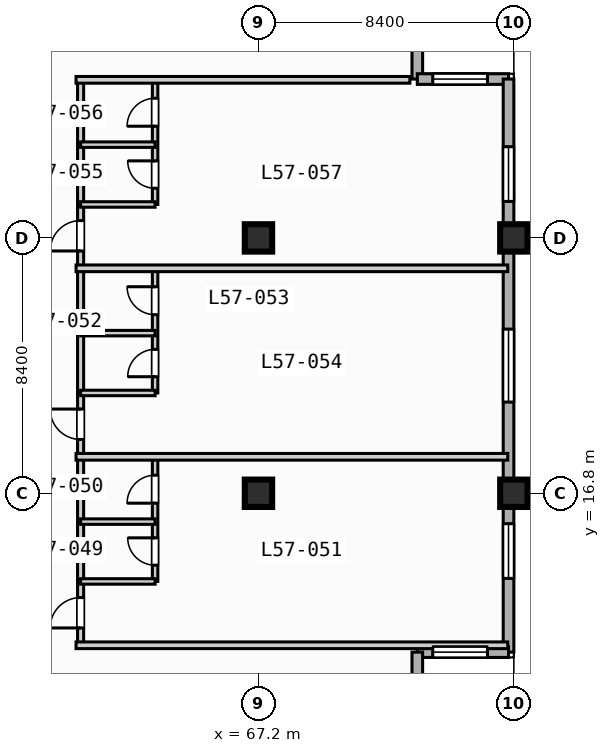
"""IFC4 building model, lengths in metres.
Left out: names, types, materials, properties, quantities, classifications, styles, units other than length and angle.
Written with IfcOpenShell. Run it as: python <this file> out.ifc"""

import sys

from ifc_helpers import new_model, si_unit, direction, frame, frame_2d, origin, origin_2d, place, context, subcontext, project, spatial, rectangle, extrude, element, fill, save


model = new_model("IFC4")
c1 = context("Model", 3, precision=1e-05, world=origin(), true_north=direction((0.0, 1.0)))
c2 = subcontext(c1, "Body", "Model", "MODEL_VIEW")
j1 = project(units=[si_unit("LENGTHUNIT", "METRE"), si_unit("PLANEANGLEUNIT", "RADIAN")], contexts=[c1])
p1 = place(None, origin())
s1 = spatial("IfcSite", under=j1, at=p1, CompositionType="ELEMENT")
p2 = place(p1, origin())
s2 = spatial("IfcBuilding", under=s1, at=p2, CompositionType="ELEMENT")
p3 = place(p2, frame((0.0, 0.0, 234.2)))
s3 = spatial("IfcBuildingStorey", under=s2, at=p3, CompositionType="ELEMENT", Elevation=234.2)
for number, where, z_axis, x_axis in (
    (1, (67.2, 16.8, 0.0), (0.0, 0.0, 1.0), (1.0, 0.0, 0.0)),
    (2, (67.2, 25.2, 0.0), (0.0, 0.0, 1.0), (1.0, 0.0, 0.0)),
    (3, (75.6, 16.8, 0.0), (0.0, 0.0, 1.0), (1.0, 0.0, 0.0)),
    (4, (75.6, 25.2, 0.0), (0.0, 0.0, 1.0), (1.0, 0.0, 0.0)),
):
    element("IfcColumn", number, at=place(p3, frame(where, z_axis=z_axis, x_axis=x_axis)), inside=s3, PredefinedType="COLUMN", context=c2, shape_type="SweptSolid", body=[
        extrude(rectangle(XDim=0.9, YDim=0.9, at=origin_2d()), origin(), (0.0, 0.0, 1.0), 3.7),
    ])
p4 = place(p3, frame((72.425, 33.425, 0.0), z_axis=(0.0, 0.0, 1.0), x_axis=(0.0, -1.0, 0.0)))
e5 = element("IfcWall", 5, at=p4, inside=s3, PredefinedType="STANDARD", context=c2, shape_type="SweptSolid", body=[
    extrude(rectangle(XDim=3.0, YDim=0.35, at=frame_2d((1.5, 0.0))), origin(), (0.0, 0.0, 1.0), 3.47),
])
p5 = place(p3, frame((72.425, 30.425, 0.0), z_axis=(0.0, 0.0, 1.0), x_axis=(1.0, 0.0, 0.0)))
e6 = element("IfcWall", 6, at=p5, inside=s3, PredefinedType="STANDARD", context=c2, shape_type="SweptSolid", body=[
    extrude(rectangle(XDim=3.0, YDim=0.35, at=frame_2d((1.5, 0.0))), origin(), (0.0, 0.0, 1.0), 3.47),
])
p6 = place(p5, frame((0.508, 0.0, 0.85)))
e7 = element("IfcOpeningElement", 7, at=p6, cuts=e6, PredefinedType="OPENING", context=c2, shape_type="SweptSolid", body=[
    extrude(rectangle(XDim=1.8, YDim=1.8, at=frame_2d((0.9, 0.9))), frame((0.0, 0.185, 0.0), z_axis=(0.0, -1.0, 0.0), x_axis=(1.0, 0.0, 0.0)), (0.0, 0.0, 1.0), 0.37),
])
p7 = place(p3, frame((75.425, 30.425, 0.0), z_axis=(0.0, 0.0, 1.0), x_axis=(0.0, -1.0, 0.0)))
e8 = element("IfcWall", 8, at=p7, inside=s3, PredefinedType="STANDARD", context=c2, shape_type="SweptSolid", body=[
    extrude(rectangle(XDim=18.85, YDim=0.35, at=frame_2d((9.425, 0.0))), origin(), (0.0, 0.0, 1.0), 3.47),
])
p8 = place(p7, frame((8.225, 0.0, 0.85)))
e9 = element("IfcOpeningElement", 9, at=p8, cuts=e8, PredefinedType="OPENING", context=c2, shape_type="SweptSolid", body=[
    extrude(rectangle(XDim=2.4, YDim=1.95, at=frame_2d((1.2, 0.975))), frame((0.0, 0.185, 0.0), z_axis=(0.0, -1.0, 0.0), x_axis=(1.0, 0.0, 0.0)), (0.0, 0.0, 1.0), 0.37),
])
p9 = place(p7, frame((14.625, 0.0, 0.85)))
e10 = element("IfcOpeningElement", 10, at=p9, cuts=e8, PredefinedType="OPENING", context=c2, shape_type="SweptSolid", body=[
    extrude(rectangle(XDim=1.8, YDim=1.8, at=frame_2d((0.9, 0.9))), frame((0.0, 0.185, 0.0), z_axis=(0.0, -1.0, 0.0), x_axis=(1.0, 0.0, 0.0)), (0.0, 0.0, 1.0), 0.37),
])
p10 = place(p7, frame((2.225, 0.0, 0.85)))
e11 = element("IfcOpeningElement", 11, at=p10, cuts=e8, PredefinedType="OPENING", context=c2, shape_type="SweptSolid", body=[
    extrude(rectangle(XDim=1.8, YDim=1.8, at=frame_2d((0.9, 0.9))), frame((0.0, 0.185, 0.0), z_axis=(0.0, -1.0, 0.0), x_axis=(1.0, 0.0, 0.0)), (0.0, 0.0, 1.0), 0.37),
])
p11 = place(p3, frame((75.425, 11.575, 0.0), z_axis=(0.0, 0.0, 1.0), x_axis=(-1.0, 0.0, 0.0)))
e12 = element("IfcWall", 12, at=p11, inside=s3, PredefinedType="STANDARD", context=c2, shape_type="SweptSolid", body=[
    extrude(rectangle(XDim=3.0, YDim=0.35, at=frame_2d((1.5, 0.0))), origin(), (0.0, 0.0, 1.0), 3.47),
])
p12 = place(p11, frame((0.692, 0.0, 0.85)))
e13 = element("IfcOpeningElement", 13, at=p12, cuts=e12, PredefinedType="OPENING", context=c2, shape_type="SweptSolid", body=[
    extrude(rectangle(XDim=1.8, YDim=1.8, at=frame_2d((0.9, 0.9))), frame((0.0, 0.185, 0.0), z_axis=(0.0, -1.0, 0.0), x_axis=(1.0, 0.0, 0.0)), (0.0, 0.0, 1.0), 0.37),
])
p13 = place(p3, frame((72.425, 11.575, 0.0), z_axis=(0.0, 0.0, 1.0), x_axis=(0.0, -1.0, 0.0)))
e14 = element("IfcWall", 14, at=p13, inside=s3, PredefinedType="STANDARD", context=c2, shape_type="SweptSolid", body=[
    extrude(rectangle(XDim=3.0, YDim=0.35, at=frame_2d((1.5, 0.0))), origin(), (0.0, 0.0, 1.0), 3.47),
])
p14 = place(p3, frame((61.35, 11.8, 0.0), z_axis=(0.0, 0.0, 1.0), x_axis=(0.0, 1.0, 0.0)))
e15 = element("IfcWall", 15, at=p14, inside=s3, PredefinedType="PARTITIONING", context=c2, shape_type="SweptSolid", body=[
    extrude(rectangle(XDim=18.6, YDim=0.2, at=frame_2d((9.3, 0.0))), origin(), (0.0, 0.0, 1.0), 3.47),
])
p15 = place(p14, frame((0.57, 0.0, 0.0)))
e16 = element("IfcOpeningElement", 16, at=p15, cuts=e15, PredefinedType="OPENING", context=c2, shape_type="SweptSolid", body=[
    extrude(rectangle(XDim=1.0, YDim=2.15, at=frame_2d((0.5, 1.075))), frame((0.0, 0.11, 0.0), z_axis=(0.0, -1.0, 0.0), x_axis=(1.0, 0.0, 0.0)), (0.0, 0.0, 1.0), 0.22),
])
p16 = place(p14, frame((6.77, 0.0, 0.0)))
e17 = element("IfcOpeningElement", 17, at=p16, cuts=e15, PredefinedType="OPENING", context=c2, shape_type="SweptSolid", body=[
    extrude(rectangle(XDim=1.0, YDim=2.15, at=frame_2d((0.5, 1.075))), frame((0.0, 0.11, 0.0), z_axis=(0.0, -1.0, 0.0), x_axis=(1.0, 0.0, 0.0)), (0.0, 0.0, 1.0), 0.22),
])
p17 = place(p14, frame((12.97, 0.0, 0.0)))
e18 = element("IfcOpeningElement", 18, at=p17, cuts=e15, PredefinedType="OPENING", context=c2, shape_type="SweptSolid", body=[
    extrude(rectangle(XDim=1.0, YDim=2.15, at=frame_2d((0.5, 1.075))), frame((0.0, 0.11, 0.0), z_axis=(0.0, -1.0, 0.0), x_axis=(1.0, 0.0, 0.0)), (0.0, 0.0, 1.0), 0.22),
])
p18 = place(p3, frame((61.2, 11.8, 0.0), z_axis=(0.0, 0.0, 1.0), x_axis=(1.0, 0.0, 0.0)))
e19 = element("IfcWall", 19, at=p18, inside=s3, PredefinedType="PARTITIONING", context=c2, shape_type="SweptSolid", body=[
    extrude(rectangle(XDim=14.2, YDim=0.22, at=frame_2d((7.1, 0.0))), origin(), (0.0, 0.0, 1.0), 3.47),
])
p19 = place(p3, frame((63.8, 13.9, 0.0), z_axis=(0.0, 0.0, 1.0), x_axis=(0.0, 1.0, 0.0)))
e20 = element("IfcWall", 20, at=p19, inside=s3, PredefinedType="PLUMBINGWALL", context=c2, shape_type="SweptSolid", body=[
    extrude(rectangle(XDim=4.1, YDim=0.18, at=frame_2d((2.05, 0.0))), origin(), (0.0, 0.0, 1.0), 3.47),
])
p20 = place(p19, frame((0.534, 0.0, 0.0)))
e21 = element("IfcOpeningElement", 21, at=p20, cuts=e20, PredefinedType="OPENING", context=c2, shape_type="SweptSolid", body=[
    extrude(rectangle(XDim=0.9, YDim=2.1, at=frame_2d((0.45, 1.05))), frame((0.0, 0.1, 0.0), z_axis=(0.0, -1.0, 0.0), x_axis=(1.0, 0.0, 0.0)), (0.0, 0.0, 1.0), 0.2),
])
p21 = place(p19, frame((2.574, 0.0, 0.0)))
e22 = element("IfcOpeningElement", 22, at=p21, cuts=e20, PredefinedType="OPENING", context=c2, shape_type="SweptSolid", body=[
    extrude(rectangle(XDim=0.92, YDim=2.1, at=frame_2d((0.46, 1.05))), frame((0.0, 0.1, 0.0), z_axis=(0.0, -1.0, 0.0), x_axis=(1.0, 0.0, 0.0)), (0.0, 0.0, 1.0), 0.2),
])
for number, where, z_axis, x_axis in (
    (23, (61.35, 13.9, 0.0), (0.0, 0.0, 1.0), (1.0, 0.0, 0.0)),
    (24, (61.35, 15.868, 0.0), (0.0, 0.0, 1.0), (1.0, 0.0, 0.0)),
):
    element("IfcWall", number, at=place(p3, frame(where, z_axis=z_axis, x_axis=x_axis)), inside=s3, PredefinedType="PLUMBINGWALL", context=c2, shape_type="SweptSolid", body=[
        extrude(rectangle(XDim=2.45, YDim=0.18, at=frame_2d((1.225, 0.0))), origin(), (0.0, 0.0, 1.0), 3.47),
    ])
p22 = place(p3, frame((61.2, 18.0, 0.0), z_axis=(0.0, 0.0, 1.0), x_axis=(1.0, 0.0, 0.0)))
e25 = element("IfcWall", 25, at=p22, inside=s3, PredefinedType="PARTITIONING", context=c2, shape_type="SweptSolid", body=[
    extrude(rectangle(XDim=14.2, YDim=0.22, at=frame_2d((7.1, 0.0))), origin(), (0.0, 0.0, 1.0), 3.47),
])
p23 = place(p3, frame((63.8, 20.1, 0.0), z_axis=(0.0, 0.0, 1.0), x_axis=(0.0, 1.0, 0.0)))
e26 = element("IfcWall", 26, at=p23, inside=s3, PredefinedType="PLUMBINGWALL", context=c2, shape_type="SweptSolid", body=[
    extrude(rectangle(XDim=4.1, YDim=0.18, at=frame_2d((2.05, 0.0))), origin(), (0.0, 0.0, 1.0), 3.47),
])
p24 = place(p23, frame((0.534, 0.0, 0.0)))
e27 = element("IfcOpeningElement", 27, at=p24, cuts=e26, PredefinedType="OPENING", context=c2, shape_type="SweptSolid", body=[
    extrude(rectangle(XDim=0.9, YDim=2.1, at=frame_2d((0.45, 1.05))), frame((0.0, 0.1, 0.0), z_axis=(0.0, -1.0, 0.0), x_axis=(1.0, 0.0, 0.0)), (0.0, 0.0, 1.0), 0.2),
])
p25 = place(p23, frame((2.574, 0.0, 0.0)))
e28 = element("IfcOpeningElement", 28, at=p25, cuts=e26, PredefinedType="OPENING", context=c2, shape_type="SweptSolid", body=[
    extrude(rectangle(XDim=0.92, YDim=2.1, at=frame_2d((0.46, 1.05))), frame((0.0, 0.1, 0.0), z_axis=(0.0, -1.0, 0.0), x_axis=(1.0, 0.0, 0.0)), (0.0, 0.0, 1.0), 0.2),
])
for number, where, z_axis, x_axis in (
    (29, (61.35, 20.1, 0.0), (0.0, 0.0, 1.0), (1.0, 0.0, 0.0)),
    (30, (61.35, 22.068, 0.0), (0.0, 0.0, 1.0), (1.0, 0.0, 0.0)),
):
    element("IfcWall", number, at=place(p3, frame(where, z_axis=z_axis, x_axis=x_axis)), inside=s3, PredefinedType="PLUMBINGWALL", context=c2, shape_type="SweptSolid", body=[
        extrude(rectangle(XDim=2.45, YDim=0.18, at=frame_2d((1.225, 0.0))), origin(), (0.0, 0.0, 1.0), 3.47),
    ])
p26 = place(p3, frame((61.2, 24.2, 0.0), z_axis=(0.0, 0.0, 1.0), x_axis=(1.0, 0.0, 0.0)))
e31 = element("IfcWall", 31, at=p26, inside=s3, PredefinedType="PARTITIONING", context=c2, shape_type="SweptSolid", body=[
    extrude(rectangle(XDim=14.2, YDim=0.22, at=frame_2d((7.1, 0.0))), origin(), (0.0, 0.0, 1.0), 3.47),
])
p27 = place(p3, frame((63.8, 26.3, 0.0), z_axis=(0.0, 0.0, 1.0), x_axis=(0.0, 1.0, 0.0)))
e32 = element("IfcWall", 32, at=p27, inside=s3, PredefinedType="PLUMBINGWALL", context=c2, shape_type="SweptSolid", body=[
    extrude(rectangle(XDim=4.1, YDim=0.18, at=frame_2d((2.05, 0.0))), origin(), (0.0, 0.0, 1.0), 3.47),
])
p28 = place(p27, frame((0.534, 0.0, 0.0)))
e33 = element("IfcOpeningElement", 33, at=p28, cuts=e32, PredefinedType="OPENING", context=c2, shape_type="SweptSolid", body=[
    extrude(rectangle(XDim=0.9, YDim=2.1, at=frame_2d((0.45, 1.05))), frame((0.0, 0.1, 0.0), z_axis=(0.0, -1.0, 0.0), x_axis=(1.0, 0.0, 0.0)), (0.0, 0.0, 1.0), 0.2),
])
p29 = place(p27, frame((2.574, 0.0, 0.0)))
e34 = element("IfcOpeningElement", 34, at=p29, cuts=e32, PredefinedType="OPENING", context=c2, shape_type="SweptSolid", body=[
    extrude(rectangle(XDim=0.92, YDim=2.1, at=frame_2d((0.46, 1.05))), frame((0.0, 0.1, 0.0), z_axis=(0.0, -1.0, 0.0), x_axis=(1.0, 0.0, 0.0)), (0.0, 0.0, 1.0), 0.2),
])
for number, where, z_axis, x_axis in (
    (35, (61.35, 26.3, 0.0), (0.0, 0.0, 1.0), (1.0, 0.0, 0.0)),
    (36, (61.35, 28.268, 0.0), (0.0, 0.0, 1.0), (1.0, 0.0, 0.0)),
):
    element("IfcWall", number, at=place(p3, frame(where, z_axis=z_axis, x_axis=x_axis)), inside=s3, PredefinedType="PLUMBINGWALL", context=c2, shape_type="SweptSolid", body=[
        extrude(rectangle(XDim=2.45, YDim=0.18, at=frame_2d((1.225, 0.0))), origin(), (0.0, 0.0, 1.0), 3.47),
    ])
p30 = place(p3, frame((61.2, 30.4, 0.0), z_axis=(0.0, 0.0, 1.0), x_axis=(1.0, 0.0, 0.0)))
e37 = element("IfcWall", 37, at=p30, inside=s3, PredefinedType="PARTITIONING", context=c2, shape_type="SweptSolid", body=[
    extrude(rectangle(XDim=10.98, YDim=0.22, at=frame_2d((5.49, 0.0))), origin(), (0.0, 0.0, 1.0), 3.47),
])
p31 = place(p6, origin())
e38 = element("IfcWindow", 38, at=p31, inside=s3, PartitioningType="SINGLE_PANEL", PredefinedType="WINDOW", context=c2, shape_type="SweptSolid", body=[
    extrude(rectangle(XDim=1.8, YDim=1.8, at=frame_2d((0.9, 0.9))), frame((0.0, 0.03, 0.0), z_axis=(0.0, -1.0, 0.0), x_axis=(1.0, 0.0, 0.0)), (0.0, 0.0, 1.0), 0.06),
])
fill(e7, e38)
p32 = place(p8, origin())
e39 = element("IfcWindow", 39, at=p32, inside=s3, PartitioningType="SINGLE_PANEL", PredefinedType="WINDOW", context=c2, shape_type="SweptSolid", body=[
    extrude(rectangle(XDim=2.4, YDim=1.95, at=frame_2d((1.2, 0.975))), frame((0.0, 0.03, 0.0), z_axis=(0.0, -1.0, 0.0), x_axis=(1.0, 0.0, 0.0)), (0.0, 0.0, 1.0), 0.06),
])
fill(e9, e39)
p33 = place(p9, origin())
e40 = element("IfcWindow", 40, at=p33, inside=s3, PartitioningType="SINGLE_PANEL", PredefinedType="WINDOW", context=c2, shape_type="SweptSolid", body=[
    extrude(rectangle(XDim=1.8, YDim=1.8, at=frame_2d((0.9, 0.9))), frame((0.0, 0.03, 0.0), z_axis=(0.0, -1.0, 0.0), x_axis=(1.0, 0.0, 0.0)), (0.0, 0.0, 1.0), 0.06),
])
fill(e10, e40)
p34 = place(p10, origin())
e41 = element("IfcWindow", 41, at=p34, inside=s3, PartitioningType="SINGLE_PANEL", PredefinedType="WINDOW", context=c2, shape_type="SweptSolid", body=[
    extrude(rectangle(XDim=1.8, YDim=1.8, at=frame_2d((0.9, 0.9))), frame((0.0, 0.03, 0.0), z_axis=(0.0, -1.0, 0.0), x_axis=(1.0, 0.0, 0.0)), (0.0, 0.0, 1.0), 0.06),
])
fill(e11, e41)
p35 = place(p12, origin())
e42 = element("IfcWindow", 42, at=p35, inside=s3, PartitioningType="SINGLE_PANEL", PredefinedType="WINDOW", context=c2, shape_type="SweptSolid", body=[
    extrude(rectangle(XDim=1.8, YDim=1.8, at=frame_2d((0.9, 0.9))), frame((0.0, 0.03, 0.0), z_axis=(0.0, -1.0, 0.0), x_axis=(1.0, 0.0, 0.0)), (0.0, 0.0, 1.0), 0.06),
])
fill(e13, e42)
p36 = place(p15, origin())
e43 = element("IfcDoor", 43, at=p36, inside=s3, OperationType="SINGLE_SWING_LEFT", PredefinedType="DOOR", context=c2, shape_type="SweptSolid", body=[
    extrude(rectangle(XDim=1.0, YDim=2.15, at=frame_2d((0.5, 1.075))), frame((0.0, 0.025, 0.0), z_axis=(0.0, -1.0, 0.0), x_axis=(1.0, 0.0, 0.0)), (0.0, 0.0, 1.0), 0.05),
])
fill(e16, e43)
p37 = place(p16, origin())
e44 = element("IfcDoor", 44, at=p37, inside=s3, OperationType="SINGLE_SWING_RIGHT", PredefinedType="DOOR", context=c2, shape_type="SweptSolid", body=[
    extrude(rectangle(XDim=1.0, YDim=2.15, at=frame_2d((0.5, 1.075))), frame((0.0, 0.025, 0.0), z_axis=(0.0, -1.0, 0.0), x_axis=(1.0, 0.0, 0.0)), (0.0, 0.0, 1.0), 0.05),
])
fill(e17, e44)
p38 = place(p17, origin())
e45 = element("IfcDoor", 45, at=p38, inside=s3, OperationType="SINGLE_SWING_LEFT", PredefinedType="DOOR", context=c2, shape_type="SweptSolid", body=[
    extrude(rectangle(XDim=1.0, YDim=2.15, at=frame_2d((0.5, 1.075))), frame((0.0, 0.025, 0.0), z_axis=(0.0, -1.0, 0.0), x_axis=(1.0, 0.0, 0.0)), (0.0, 0.0, 1.0), 0.05),
])
fill(e18, e45)
p39 = place(p20, origin())
e46 = element("IfcDoor", 46, at=p39, inside=s3, OperationType="SINGLE_SWING_RIGHT", PredefinedType="DOOR", context=c2, shape_type="SweptSolid", body=[
    extrude(rectangle(XDim=0.9, YDim=2.1, at=frame_2d((0.45, 1.05))), frame((0.0, 0.025, 0.0), z_axis=(0.0, -1.0, 0.0), x_axis=(1.0, 0.0, 0.0)), (0.0, 0.0, 1.0), 0.05),
])
fill(e21, e46)
p40 = place(p21, origin())
e47 = element("IfcDoor", 47, at=p40, inside=s3, OperationType="SINGLE_SWING_LEFT", PredefinedType="DOOR", context=c2, shape_type="SweptSolid", body=[
    extrude(rectangle(XDim=0.92, YDim=2.1, at=frame_2d((0.46, 1.05))), frame((0.0, 0.025, 0.0), z_axis=(0.0, -1.0, 0.0), x_axis=(1.0, 0.0, 0.0)), (0.0, 0.0, 1.0), 0.05),
])
fill(e22, e47)
p41 = place(p24, origin())
e48 = element("IfcDoor", 48, at=p41, inside=s3, OperationType="SINGLE_SWING_LEFT", PredefinedType="DOOR", context=c2, shape_type="SweptSolid", body=[
    extrude(rectangle(XDim=0.9, YDim=2.1, at=frame_2d((0.45, 1.05))), frame((0.0, 0.025, 0.0), z_axis=(0.0, -1.0, 0.0), x_axis=(1.0, 0.0, 0.0)), (0.0, 0.0, 1.0), 0.05),
])
fill(e27, e48)
p42 = place(p25, origin())
e49 = element("IfcDoor", 49, at=p42, inside=s3, OperationType="SINGLE_SWING_RIGHT", PredefinedType="DOOR", context=c2, shape_type="SweptSolid", body=[
    extrude(rectangle(XDim=0.92, YDim=2.1, at=frame_2d((0.46, 1.05))), frame((0.0, 0.025, 0.0), z_axis=(0.0, -1.0, 0.0), x_axis=(1.0, 0.0, 0.0)), (0.0, 0.0, 1.0), 0.05),
])
fill(e28, e49)
p43 = place(p28, origin())
e50 = element("IfcDoor", 50, at=p43, inside=s3, OperationType="SINGLE_SWING_RIGHT", PredefinedType="DOOR", context=c2, shape_type="SweptSolid", body=[
    extrude(rectangle(XDim=0.9, YDim=2.1, at=frame_2d((0.45, 1.05))), frame((0.0, 0.025, 0.0), z_axis=(0.0, -1.0, 0.0), x_axis=(1.0, 0.0, 0.0)), (0.0, 0.0, 1.0), 0.05),
])
fill(e33, e50)
p44 = place(p29, origin())
e51 = element("IfcDoor", 51, at=p44, inside=s3, OperationType="SINGLE_SWING_LEFT", PredefinedType="DOOR", context=c2, shape_type="SweptSolid", body=[
    extrude(rectangle(XDim=0.92, YDim=2.1, at=frame_2d((0.46, 1.05))), frame((0.0, 0.025, 0.0), z_axis=(0.0, -1.0, 0.0), x_axis=(1.0, 0.0, 0.0)), (0.0, 0.0, 1.0), 0.05),
])
fill(e34, e51)
save(model, sys.argv[1])
